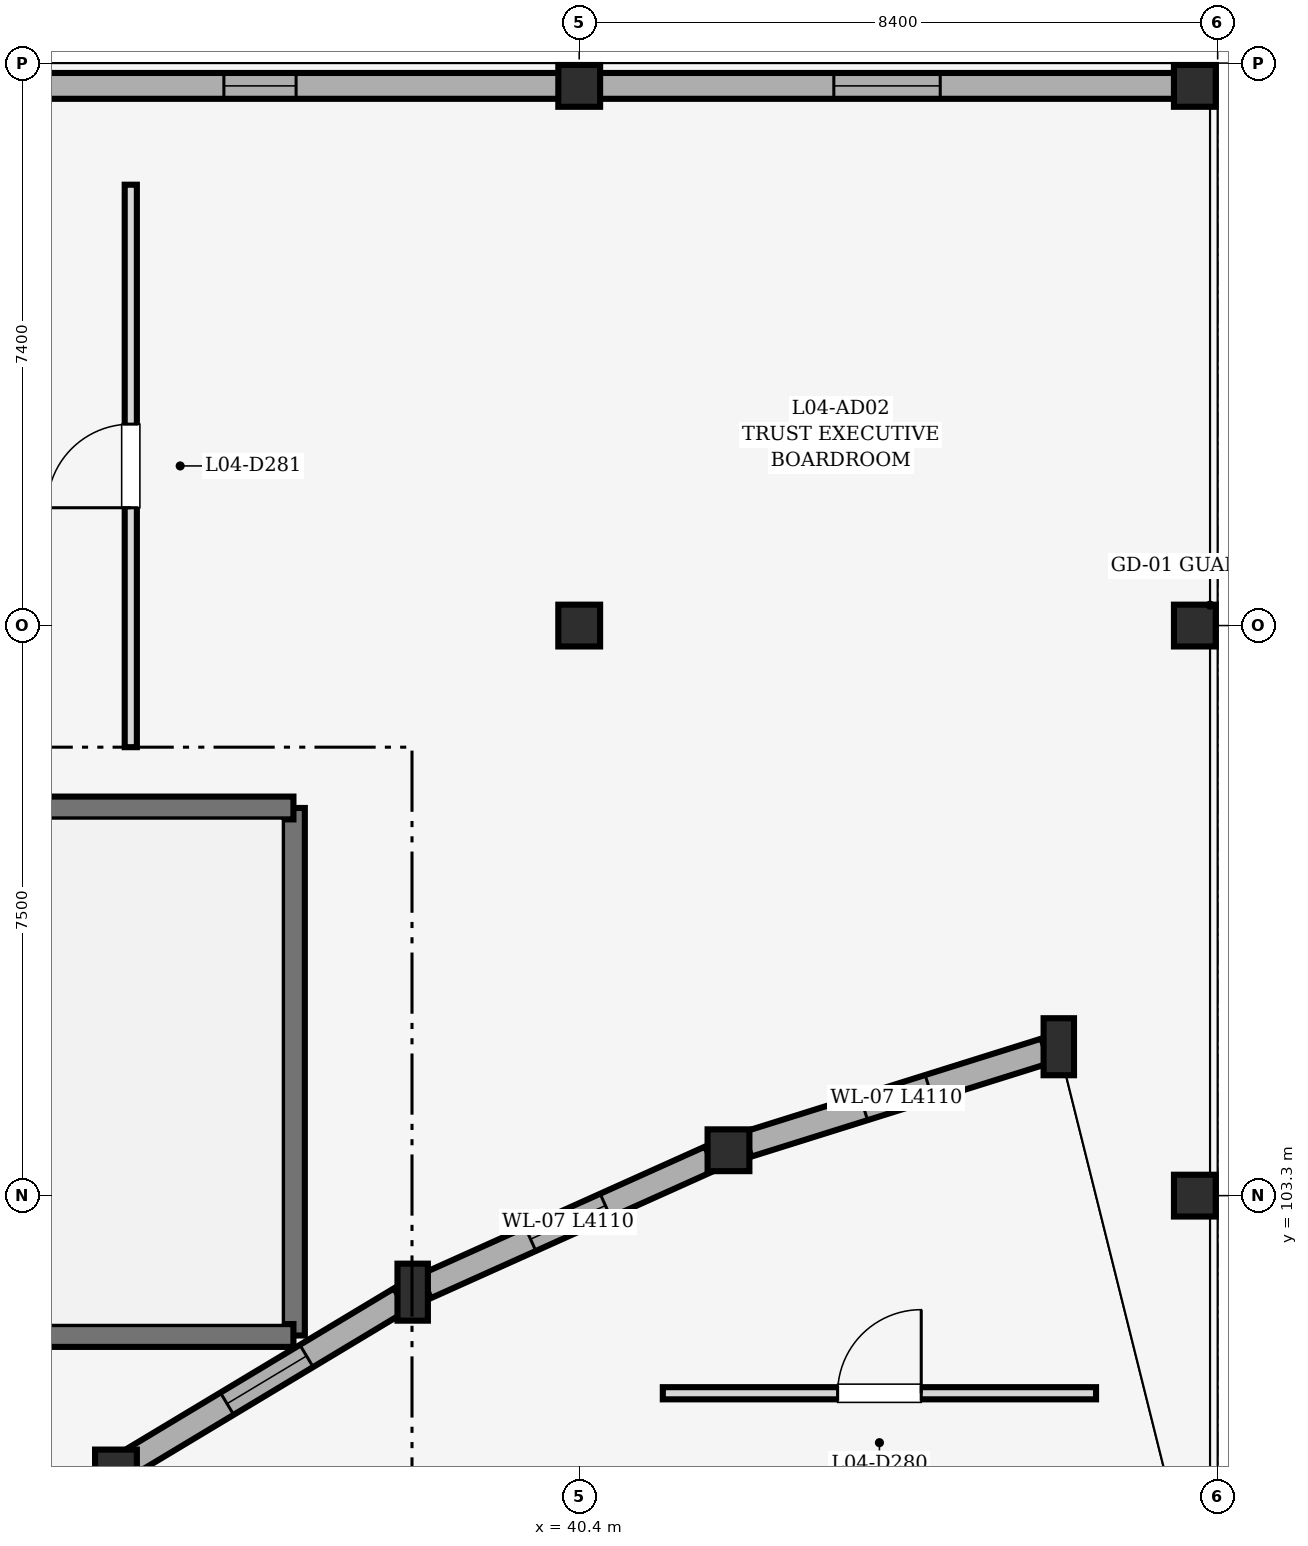
"""IFC4 building model, lengths in metres.
Left out: names, types, materials, properties, quantities, classifications, styles, units other than length and angle.
Written with IfcOpenShell. Run it as: python <this file> out.ifc"""

import sys

from ifc_helpers import new_model, si_unit, direction, frame, frame_2d, origin, origin_2d, place, context, subcontext, project, spatial, rectangle, extrude, element, fill, save


model = new_model("IFC4")
c1 = context("Model", 3, precision=1e-05, world=origin(), true_north=direction((0.0, 1.0)))
c2 = subcontext(c1, "Body", "Model", "MODEL_VIEW")
j1 = project(units=[si_unit("LENGTHUNIT", "METRE"), si_unit("PLANEANGLEUNIT", "RADIAN")], contexts=[c1])
p1 = place(None, origin())
s1 = spatial("IfcSite", under=j1, at=p1, CompositionType="ELEMENT")
p2 = place(p1, origin())
s2 = spatial("IfcBuilding", under=s1, at=p2, CompositionType="ELEMENT")
p3 = place(p2, frame((0.0, 0.0, 14.7)))
s3 = spatial("IfcBuildingStorey", under=s2, at=p3, CompositionType="ELEMENT", Elevation=14.7)
p4 = place(p3, frame((46.71, 105.259, 0.0), z_axis=(0.0, 0.0, 1.0), x_axis=(1.0, 0.0, 0.0)))
e1 = element("IfcColumn", 1, at=p4, inside=s3, PredefinedType="PILASTER", context=c2, shape_type="SweptSolid", body=[
    extrude(rectangle(XDim=0.4, YDim=0.75, at=origin_2d()), origin(), (0.0, 0.0, 1.0), 4.5),
])
p5 = place(p3, frame((42.364, 103.897, 0.0), z_axis=(0.0, 0.0, 1.0), x_axis=(1.0, 0.0, 0.0)))
e2 = element("IfcColumn", 2, at=p5, inside=s3, PredefinedType="COLUMN", context=c2, shape_type="SweptSolid", body=[
    extrude(rectangle(XDim=0.55, YDim=0.55, at=origin_2d()), origin(), (0.0, 0.0, 1.0), 4.5),
])
p6 = place(p3, frame((38.209, 102.03, 0.0), z_axis=(0.0, 0.0, 1.0), x_axis=(1.0, 0.0, 0.0)))
e3 = element("IfcColumn", 3, at=p6, inside=s3, PredefinedType="PILASTER", context=c2, shape_type="SweptSolid", body=[
    extrude(rectangle(XDim=0.4, YDim=0.75, at=origin_2d()), origin(), (0.0, 0.0, 1.0), 4.5),
])
for number, where, z_axis, x_axis in (
    (4, (34.305, 99.684, 0.0), (0.0, 0.0, 1.0), (1.0, 0.0, 0.0)),
    (5, (40.4, 110.8, 0.0), (0.0, 0.0, 1.0), (1.0, 0.0, 0.0)),
    (6, (40.4, 117.9, 0.0), (0.0, 0.0, 1.0), (1.0, 0.0, 0.0)),
    (7, (48.5, 103.3, 0.0), (0.0, 0.0, 1.0), (1.0, 0.0, 0.0)),
    (8, (48.5, 110.8, 0.0), (0.0, 0.0, 1.0), (1.0, 0.0, 0.0)),
    (9, (48.5, 117.9, 0.0), (0.0, 0.0, 1.0), (1.0, 0.0, 0.0)),
):
    element("IfcColumn", number, at=place(p3, frame(where, z_axis=z_axis, x_axis=x_axis)), inside=s3, PredefinedType="COLUMN", context=c2, shape_type="SweptSolid", body=[
        extrude(rectangle(XDim=0.55, YDim=0.55, at=origin_2d()), origin(), (0.0, 0.0, 1.0), 4.5),
    ])
p7 = place(p3, frame((46.534, 105.204, 0.0), z_axis=(0.0, 0.0, 1.0), x_axis=(-0.954237600376, -0.299049497622, 0.0)))
e10 = element("IfcWall", 10, at=p7, inside=s3, PredefinedType="STANDARD", context=c2, shape_type="SweptSolid", body=[
    extrude(rectangle(XDim=4.11, YDim=0.34, at=frame_2d((2.055, 0.0))), origin(), (0.0, 0.0, 1.0), 3.797),
])
p8 = place(p7, frame((1.605, 0.0, 0.85)))
e11 = element("IfcOpeningElement", 11, at=p8, cuts=e10, PredefinedType="OPENING", context=c2, shape_type="SweptSolid", body=[
    extrude(rectangle(XDim=0.9, YDim=1.5, at=frame_2d((0.45, 0.75))), frame((0.0, 0.182, 0.0), z_axis=(0.0, -1.0, 0.0), x_axis=(1.0, 0.0, 0.0)), (0.0, 0.0, 1.0), 0.364),
])
p9 = place(p3, frame((42.127, 103.791, 0.0), z_axis=(0.0, 0.0, 1.0), x_axis=(-0.912105926967, -0.409954604794, 0.0)))
e12 = element("IfcWall", 12, at=p9, inside=s3, PredefinedType="STANDARD", context=c2, shape_type="SweptSolid", body=[
    extrude(rectangle(XDim=4.11, YDim=0.34, at=frame_2d((2.055, 0.0))), origin(), (0.0, 0.0, 1.0), 3.797),
])
p10 = place(p9, frame((1.515, 0.0, 0.85)))
e13 = element("IfcOpeningElement", 13, at=p10, cuts=e12, PredefinedType="OPENING", context=c2, shape_type="SweptSolid", body=[
    extrude(rectangle(XDim=1.08, YDim=1.5, at=frame_2d((0.54, 0.75))), frame((0.0, 0.182, 0.0), z_axis=(0.0, -1.0, 0.0), x_axis=(1.0, 0.0, 0.0)), (0.0, 0.0, 1.0), 0.364),
])
p11 = place(p3, frame((34.528, 99.818, 0.0), z_axis=(0.0, 0.0, 1.0), x_axis=(0.85717299245, 0.515028602131, 0.0)))
e14 = element("IfcWall", 14, at=p11, inside=s3, PredefinedType="STANDARD", context=c2, shape_type="SweptSolid", body=[
    extrude(rectangle(XDim=4.109, YDim=0.34, at=frame_2d((2.055, 0.0))), origin(), (0.0, 0.0, 1.0), 3.797),
])
p12 = place(p11, frame((1.445, 0.0, 0.85)))
e15 = element("IfcOpeningElement", 15, at=p12, cuts=e14, PredefinedType="OPENING", context=c2, shape_type="SweptSolid", body=[
    extrude(rectangle(XDim=1.22, YDim=1.5, at=frame_2d((0.61, 0.75))), frame((0.0, 0.182, 0.0), z_axis=(0.0, -1.0, 0.0), x_axis=(1.0, 0.0, 0.0)), (0.0, 0.0, 1.0), 0.364),
])
p13 = place(p3, frame((32.26, 117.9, 0.0), z_axis=(0.0, 0.0, 1.0), x_axis=(1.0, 0.0, 0.0)))
e16 = element("IfcWall", 16, at=p13, inside=s3, PredefinedType="STANDARD", context=c2, shape_type="SweptSolid", body=[
    extrude(rectangle(XDim=7.88, YDim=0.34, at=frame_2d((3.94, 0.0))), origin(), (0.0, 0.0, 1.0), 3.397),
])
p14 = place(p13, frame((3.465, 0.0, 0.85)))
e17 = element("IfcOpeningElement", 17, at=p14, cuts=e16, PredefinedType="OPENING", context=c2, shape_type="SweptSolid", body=[
    extrude(rectangle(XDim=0.95, YDim=2.2, at=frame_2d((0.475, 1.1))), frame((0.0, 0.182, 0.0), z_axis=(0.0, -1.0, 0.0), x_axis=(1.0, 0.0, 0.0)), (0.0, 0.0, 1.0), 0.364),
])
p15 = place(p3, frame((40.66, 117.9, 0.0), z_axis=(0.0, 0.0, 1.0), x_axis=(1.0, 0.0, 0.0)))
e18 = element("IfcWall", 18, at=p15, inside=s3, PredefinedType="STANDARD", context=c2, shape_type="SweptSolid", body=[
    extrude(rectangle(XDim=7.58, YDim=0.34, at=frame_2d((3.79, 0.0))), origin(), (0.0, 0.0, 1.0), 3.545),
])
p16 = place(p15, frame((3.09, 0.0, 0.85)))
e19 = element("IfcOpeningElement", 19, at=p16, cuts=e18, PredefinedType="OPENING", context=c2, shape_type="SweptSolid", body=[
    extrude(rectangle(XDim=1.4, YDim=2.2, at=frame_2d((0.7, 1.1))), frame((0.0, 0.182, 0.0), z_axis=(0.0, -1.0, 0.0), x_axis=(1.0, 0.0, 0.0)), (0.0, 0.0, 1.0), 0.364),
])
p17 = place(p3, frame((36.64, 108.4, 0.0), z_axis=(0.0, 0.0, 1.0), x_axis=(0.0, -1.0, 0.0)))
e20 = element("IfcWall", 20, at=p17, inside=s3, PredefinedType="SHEAR", context=c2, shape_type="SweptSolid", body=[
    extrude(rectangle(XDim=6.94, YDim=0.3, at=frame_2d((3.47, 0.0))), origin(), (0.0, 0.0, 1.0), 4.26),
])
for number, where, z_axis, x_axis in (
    (21, (36.64, 101.46, 0.0), (0.0, 0.0, 1.0), (-1.0, 0.0, 0.0)),
    (22, (24.96, 108.4, 0.0), (0.0, 0.0, 1.0), (1.0, 0.0, 0.0)),
):
    element("IfcWall", number, at=place(p3, frame(where, z_axis=z_axis, x_axis=x_axis)), inside=s3, PredefinedType="SHEAR", context=c2, shape_type="SweptSolid", body=[
        extrude(rectangle(XDim=11.68, YDim=0.3, at=frame_2d((5.84, 0.0))), origin(), (0.0, 0.0, 1.0), 4.26),
    ])
p18 = place(p3, frame((41.5, 100.7, 0.0), z_axis=(0.0, 0.0, 1.0), x_axis=(1.0, 0.0, 0.0)))
e23 = element("IfcWall", 23, at=p18, inside=s3, PredefinedType="PARTITIONING", context=c2, shape_type="SweptSolid", body=[
    extrude(rectangle(XDim=5.7, YDim=0.16, at=frame_2d((2.85, 0.0))), origin(), (0.0, 0.0, 1.0), 3.849),
])
p19 = place(p18, frame((2.3, 0.0, 0.0)))
e24 = element("IfcOpeningElement", 24, at=p19, cuts=e23, PredefinedType="OPENING", context=c2, shape_type="SweptSolid", body=[
    extrude(rectangle(XDim=1.1, YDim=2.2, at=frame_2d((0.55, 1.1))), frame((0.0, 0.092, 0.0), z_axis=(0.0, -1.0, 0.0), x_axis=(1.0, 0.0, 0.0)), (0.0, 0.0, 1.0), 0.184),
])
p20 = place(p3, frame((34.5, 109.2, 0.0), z_axis=(0.0, 0.0, 1.0), x_axis=(0.0, 1.0, 0.0)))
e25 = element("IfcWall", 25, at=p20, inside=s3, PredefinedType="PARTITIONING", context=c2, shape_type="SweptSolid", body=[
    extrude(rectangle(XDim=7.4, YDim=0.16, at=frame_2d((3.7, 0.0))), origin(), (0.0, 0.0, 1.0), 4.145),
])
p21 = place(p20, frame((3.15, 0.0, 0.0)))
e26 = element("IfcOpeningElement", 26, at=p21, cuts=e25, PredefinedType="OPENING", context=c2, shape_type="SweptSolid", body=[
    extrude(rectangle(XDim=1.1, YDim=2.2, at=frame_2d((0.55, 1.1))), frame((0.0, 0.092, 0.0), z_axis=(0.0, -1.0, 0.0), x_axis=(1.0, 0.0, 0.0)), (0.0, 0.0, 1.0), 0.184),
])
p22 = place(p8, origin())
e27 = element("IfcWindow", 27, at=p22, inside=s3, PartitioningType="DOUBLE_PANEL_VERTICAL", PredefinedType="WINDOW", context=c2, shape_type="SweptSolid", body=[
    extrude(rectangle(XDim=0.9, YDim=1.5, at=frame_2d((0.45, 0.75))), frame((0.0, 0.03, 0.0), z_axis=(0.0, -1.0, 0.0), x_axis=(1.0, 0.0, 0.0)), (0.0, 0.0, 1.0), 0.06),
])
fill(e11, e27)
p23 = place(p10, origin())
e28 = element("IfcWindow", 28, at=p23, inside=s3, PartitioningType="DOUBLE_PANEL_VERTICAL", PredefinedType="WINDOW", context=c2, shape_type="SweptSolid", body=[
    extrude(rectangle(XDim=1.08, YDim=1.5, at=frame_2d((0.54, 0.75))), frame((0.0, 0.03, 0.0), z_axis=(0.0, -1.0, 0.0), x_axis=(1.0, 0.0, 0.0)), (0.0, 0.0, 1.0), 0.06),
])
fill(e13, e28)
p24 = place(p12, origin())
e29 = element("IfcWindow", 29, at=p24, inside=s3, PartitioningType="DOUBLE_PANEL_VERTICAL", PredefinedType="WINDOW", context=c2, shape_type="SweptSolid", body=[
    extrude(rectangle(XDim=1.22, YDim=1.5, at=frame_2d((0.61, 0.75))), frame((0.0, 0.03, 0.0), z_axis=(0.0, -1.0, 0.0), x_axis=(1.0, 0.0, 0.0)), (0.0, 0.0, 1.0), 0.06),
])
fill(e15, e29)
p25 = place(p14, origin())
e30 = element("IfcWindow", 30, at=p25, inside=s3, PartitioningType="DOUBLE_PANEL_VERTICAL", PredefinedType="WINDOW", context=c2, shape_type="SweptSolid", body=[
    extrude(rectangle(XDim=0.95, YDim=2.2, at=frame_2d((0.475, 1.1))), frame((0.0, 0.03, 0.0), z_axis=(0.0, -1.0, 0.0), x_axis=(1.0, 0.0, 0.0)), (0.0, 0.0, 1.0), 0.06),
])
fill(e17, e30)
p26 = place(p16, origin())
e31 = element("IfcWindow", 31, at=p26, inside=s3, PartitioningType="DOUBLE_PANEL_VERTICAL", PredefinedType="WINDOW", context=c2, shape_type="SweptSolid", body=[
    extrude(rectangle(XDim=1.4, YDim=2.2, at=frame_2d((0.7, 1.1))), frame((0.0, 0.03, 0.0), z_axis=(0.0, -1.0, 0.0), x_axis=(1.0, 0.0, 0.0)), (0.0, 0.0, 1.0), 0.06),
])
fill(e19, e31)
p27 = place(p19, origin())
e32 = element("IfcDoor", 32, at=p27, inside=s3, OperationType="SINGLE_SWING_RIGHT", PredefinedType="DOOR", context=c2, shape_type="SweptSolid", body=[
    extrude(rectangle(XDim=1.1, YDim=2.2, at=frame_2d((0.55, 1.1))), frame((0.0, 0.025, 0.0), z_axis=(0.0, -1.0, 0.0), x_axis=(1.0, 0.0, 0.0)), (0.0, 0.0, 1.0), 0.05),
])
fill(e24, e32)
p28 = place(p21, origin())
e33 = element("IfcDoor", 33, at=p28, inside=s3, OperationType="SINGLE_SWING_LEFT", PredefinedType="DOOR", context=c2, shape_type="SweptSolid", body=[
    extrude(rectangle(XDim=1.1, YDim=2.2, at=frame_2d((0.55, 1.1))), frame((0.0, 0.025, 0.0), z_axis=(0.0, -1.0, 0.0), x_axis=(1.0, 0.0, 0.0)), (0.0, 0.0, 1.0), 0.05),
])
fill(e26, e33)
save(model, sys.argv[1])
